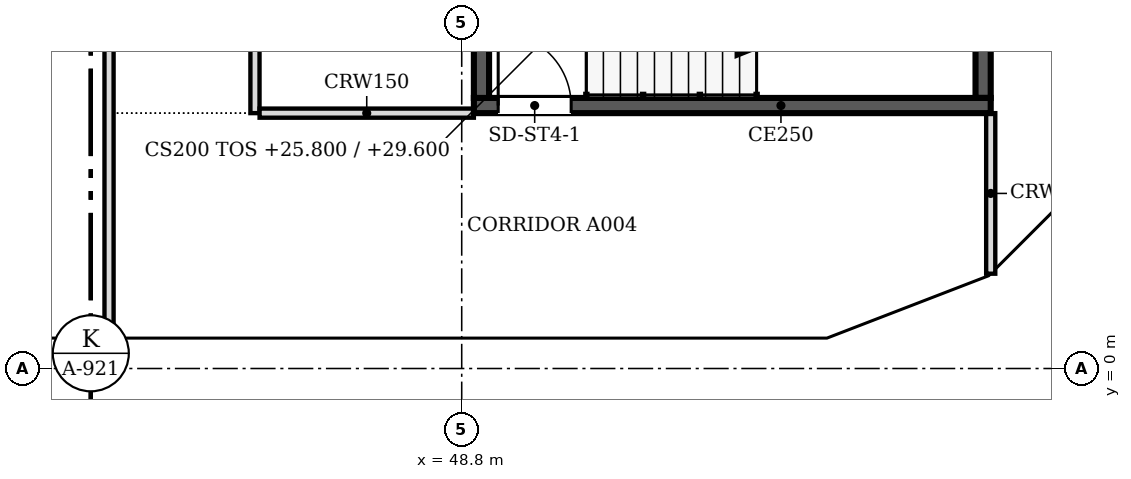
"""IFC4 building model, lengths in metres.
Left out: names, types, materials, properties, quantities, classifications, styles, units other than length and angle.
Written with IfcOpenShell. Run it as: python <this file> out.ifc"""

import sys

from ifc_helpers import new_model, si_unit, direction, frame, frame_2d, origin, place, context, subcontext, project, spatial, polyline, rectangle, outline, extrude, faceted_brep, source, transform, mapped, element, fill, save


model = new_model("IFC4")
c1 = context("Model", 3, precision=1e-05, world=origin(), true_north=direction((0.0, 1.0)))
c2 = subcontext(c1, "Body", "Model", "MODEL_VIEW")
j1 = project(units=[si_unit("LENGTHUNIT", "METRE"), si_unit("PLANEANGLEUNIT", "RADIAN")], contexts=[c1])
p1 = place(None, origin())
s1 = spatial("IfcSite", under=j1, at=p1, CompositionType="ELEMENT")
p2 = place(p1, origin())
s2 = spatial("IfcBuilding", under=s1, at=p2, CompositionType="ELEMENT")
p3 = place(p2, frame((0.0, 0.0, 25.8)))
s3 = spatial("IfcBuildingStorey", under=s2, at=p3, CompositionType="ELEMENT", Elevation=25.8)
m1 = source(origin(), c2, "Body", "SweptSolid", [
    extrude(outline(polyline([(6.1, 0.0), (3.05, 3.8), (0.0, 0.0), (6.1, 0.0)])), frame((0.0, 0.25, 0.0), z_axis=(0.0, -1.0, 0.0), x_axis=(1.0, 0.0, 0.0)), (0.0, 0.0, 1.0), 0.5),
])
p4 = place(p3, frame((39.65, 0.25, 0.0), z_axis=(0.0, 0.0, 1.0), x_axis=(1.0, 0.0, 0.0)))
e1 = element("IfcWall", 1, at=p4, inside=s3, PredefinedType="SOLIDWALL", context=c2, shape_type="MappedRepresentation", body=[
    mapped(m1, transform((0.0, 0.0, 0.0), scale=1.0)),
])
m2 = source(origin(), c2, "Body", "SweptSolid", [
    extrude(outline(polyline([(5.579, 0.25), (3.05, 3.401), (0.521, 0.25), (5.579, 0.25)])), frame((0.0, 0.26, 0.0), z_axis=(0.0, -1.0, 0.0), x_axis=(1.0, 0.0, 0.0)), (0.0, 0.0, 1.0), 0.52),
])
p5 = place(p4, origin())
e2 = element("IfcOpeningElement", 2, at=p5, cuts=e1, PredefinedType="OPENING", context=c2, shape_type="MappedRepresentation", body=[
    mapped(m2, transform((0.0, 0.0, 0.0), scale=1.0)),
])
p6 = place(p3, frame((45.75, 0.25, 0.0), z_axis=(0.0, 0.0, 1.0), x_axis=(1.0, 0.0, 0.0)))
e3 = element("IfcWall", 3, at=p6, inside=s3, PredefinedType="SOLIDWALL", context=c2, shape_type="MappedRepresentation", body=[
    mapped(m1, transform((0.0, 0.0, 0.0), scale=1.0)),
])
p7 = place(p6, origin())
e4 = element("IfcOpeningElement", 4, at=p7, cuts=e3, PredefinedType="OPENING", context=c2, shape_type="MappedRepresentation", body=[
    mapped(m2, transform((0.0, 0.0, 0.0), scale=1.0)),
])
m3 = source(origin(), c2, "Body", "Brep", [
    faceted_brep([(3.05, -0.25, 3.74), (3.003, -0.25, 3.8), (0.0, -0.25, 0.0), (3.05, -0.25, 0.0), (0.0, 0.25, 0.0), (2.957, 0.25, 3.741), (2.957, 0.25, 0.0), (3.003, 0.0, 3.8)], [[[0, 1, 2, 3]], [[4, 5, 6]], [[7, 1, 0]], [[5, 4, 2, 1, 7]], [[4, 6, 3, 2]], [[3, 6, 5, 7, 0]]]),
])
p8 = place(p3, frame((51.85, 0.25, 0.0), z_axis=(0.0, 0.0, 1.0), x_axis=(1.0, 0.0, 0.0)))
e5 = element("IfcWall", 5, at=p8, inside=s3, PredefinedType="SOLIDWALL", context=c2, shape_type="MappedRepresentation", body=[
    mapped(m3, transform((0.0, 0.0, 0.0), scale=1.0)),
])
m4 = source(origin(), c2, "Body", "SweptSolid", [
    extrude(outline(polyline([(2.803, 3.144), (0.516, 0.25), (2.803, 0.25), (2.803, 3.144)])), frame((0.0, 0.26, 0.0), z_axis=(0.0, -1.0, 0.0), x_axis=(1.0, 0.0, 0.0)), (0.0, 0.0, 1.0), 0.52),
])
p9 = place(p8, origin())
e6 = element("IfcOpeningElement", 6, at=p9, cuts=e5, PredefinedType="OPENING", context=c2, shape_type="MappedRepresentation", body=[
    mapped(m4, transform((0.0, 0.0, 0.0), scale=1.0)),
])
m5 = source(origin(), c2, "Body", "Brep", [
    faceted_brep([(2.997, -0.25, 0.0), (0.047, -0.25, 3.8), (0.0, -0.25, 3.741), (0.0, -0.25, 0.0), (0.093, 0.25, 3.74), (2.944, 0.25, 0.068), (2.944, 0.25, 0.0), (0.093, 0.25, 0.0), (0.047, 0.0, 3.8), (2.997, 0.0, 0.0)], [[[0, 1, 2, 3]], [[4, 5, 6, 7]], [[5, 4, 8, 1, 0, 9]], [[2, 1, 8]], [[7, 6, 9, 0, 3]], [[7, 3, 2, 8, 4]], [[9, 6, 5]]]),
])
p10 = place(p3, frame((54.81, 0.233, 0.0), z_axis=(0.0, 0.0, 1.0), x_axis=(0.932990326376, 0.359901446078, 0.0)))
e7 = element("IfcWall", 7, at=p10, inside=s3, PredefinedType="SOLIDWALL", context=c2, shape_type="MappedRepresentation", body=[
    mapped(m5, transform((0.0, 0.0, 0.0), scale=1.0)),
])
m6 = source(origin(), c2, "Body", "SweptSolid", [
    extrude(outline(polyline([(2.487, 0.25), (0.247, 3.135), (0.247, 0.25), (2.487, 0.25)])), frame((0.0, 0.26, 0.0), z_axis=(0.0, -1.0, 0.0), x_axis=(1.0, 0.0, 0.0)), (0.0, 0.0, 1.0), 0.52),
])
p11 = place(p10, origin())
e8 = element("IfcOpeningElement", 8, at=p11, cuts=e7, PredefinedType="OPENING", context=c2, shape_type="MappedRepresentation", body=[
    mapped(m6, transform((0.0, 0.0, 0.0), scale=1.0)),
])
m7 = source(origin(), c2, "Body", "Brep", [
    faceted_brep([(2.997, -0.25, 3.732), (2.944, -0.25, 3.8), (0.0, -0.25, 0.0), (2.997, -0.25, 0.0), (0.053, 0.25, 0.068), (2.891, 0.25, 3.732), (2.891, 0.25, 0.0), (0.053, 0.25, 0.0), (2.944, 0.0, 3.8), (0.0, 0.0, 0.0)], [[[0, 1, 2, 3]], [[4, 5, 6, 7]], [[8, 1, 0]], [[5, 4, 9, 2, 1, 8]], [[7, 6, 3, 2, 9]], [[7, 9, 4]], [[3, 6, 5, 8, 0]]]),
])
p12 = place(p3, frame((57.606, 1.312, 0.0), z_axis=(0.0, 0.0, 1.0), x_axis=(0.707147509625, 0.707066050402, 0.0)))
e9 = element("IfcWall", 9, at=p12, inside=s3, PredefinedType="SOLIDWALL", context=c2, shape_type="MappedRepresentation", body=[
    mapped(m7, transform((0.0, 0.0, 0.0), scale=1.0)),
])
m8 = source(origin(), c2, "Body", "SweptSolid", [
    extrude(outline(polyline([(2.744, 3.134), (0.51, 0.25), (2.744, 0.25), (2.744, 3.134)])), frame((0.0, 0.26, 0.0), z_axis=(0.0, -1.0, 0.0), x_axis=(1.0, 0.0, 0.0)), (0.0, 0.0, 1.0), 0.52),
])
p13 = place(p12, origin())
e10 = element("IfcOpeningElement", 10, at=p13, cuts=e9, PredefinedType="OPENING", context=c2, shape_type="MappedRepresentation", body=[
    mapped(m8, transform((0.0, 0.0, 0.0), scale=1.0)),
])
p14 = place(p2, frame((0.0, 0.0, 29.6)))
s4 = spatial("IfcBuildingStorey", under=s2, at=p14, CompositionType="ELEMENT", Elevation=29.6)
m9 = source(origin(), c2, "Body", "Brep", [
    faceted_brep([(3.05, -0.25, 0.0), (6.1, -0.25, 3.8), (6.1, -0.25, 3.8), (3.05, -0.25, 7.6), (0.0, -0.25, 3.8), (0.0, 0.25, 3.8), (3.05, 0.25, 7.6), (6.1, 0.25, 3.8), (6.1, 0.25, 3.8), (3.05, 0.25, 0.0)], [[[0, 1, 2, 3, 4]], [[5, 6, 7, 8, 9]], [[9, 8, 1, 0]], [[7, 6, 3, 2]], [[6, 5, 4, 3]], [[5, 9, 0, 4]], [[1, 8, 7, 2]]]),
])
p15 = place(p14, frame((36.6, 0.25, -3.8), z_axis=(0.0, 0.0, 1.0), x_axis=(1.0, 0.0, 0.0)))
e11 = element("IfcWall", 11, at=p15, inside=s4, PredefinedType="SOLIDWALL", context=c2, shape_type="MappedRepresentation", body=[
    mapped(m9, transform((0.0, 0.0, 0.0), scale=1.0)),
])
m10 = source(origin(), c2, "Body", "SweptSolid", [
    extrude(outline(polyline([(3.05, 0.399), (5.78, 3.8), (3.05, 7.2), (0.321, 3.8), (3.05, 0.399)])), frame((0.0, 0.26, 0.0), z_axis=(0.0, -1.0, 0.0), x_axis=(1.0, 0.0, 0.0)), (0.0, 0.0, 1.0), 0.52),
])
p16 = place(p15, origin())
e12 = element("IfcOpeningElement", 12, at=p16, cuts=e11, PredefinedType="OPENING", context=c2, shape_type="MappedRepresentation", body=[
    mapped(m10, transform((0.0, 0.0, 0.0), scale=1.0)),
])
m11 = source(origin(), c2, "Body", "SweptSolid", [
    extrude(outline(polyline([(3.05, 0.0), (6.1, 3.8), (3.05, 7.6), (0.0, 3.8), (3.05, 0.0)])), frame((0.0, 0.25, 0.0), z_axis=(0.0, -1.0, 0.0), x_axis=(1.0, 0.0, 0.0)), (0.0, 0.0, 1.0), 0.5),
])
p17 = place(p14, frame((42.7, 0.25, -3.8), z_axis=(0.0, 0.0, 1.0), x_axis=(1.0, 0.0, 0.0)))
e13 = element("IfcWall", 13, at=p17, inside=s4, PredefinedType="SOLIDWALL", context=c2, shape_type="MappedRepresentation", body=[
    mapped(m11, transform((0.0, 0.0, 0.0), scale=1.0)),
])
p18 = place(p17, origin())
e14 = element("IfcOpeningElement", 14, at=p18, cuts=e13, PredefinedType="OPENING", context=c2, shape_type="MappedRepresentation", body=[
    mapped(m10, transform((0.0, 0.0, 0.0), scale=1.0)),
])
m12 = source(origin(), c2, "Body", "Brep", [
    faceted_brep([(3.05, -0.25, 0.0), (6.053, -0.25, 3.8), (3.05, -0.25, 7.6), (0.0, -0.25, 3.8), (0.0, 0.25, 3.8), (3.05, 0.25, 7.6), (6.007, 0.25, 3.859), (6.007, 0.25, 3.741), (3.05, 0.25, 0.0), (6.053, 0.0, 3.8)], [[[0, 1, 2, 3]], [[4, 5, 6, 7, 8]], [[8, 7, 9, 1, 0]], [[6, 5, 2, 1, 9]], [[5, 4, 3, 2]], [[4, 8, 0, 3]], [[7, 6, 9]]]),
])
p19 = place(p14, frame((48.8, 0.25, -3.8), z_axis=(0.0, 0.0, 1.0), x_axis=(1.0, 0.0, 0.0)))
e15 = element("IfcWall", 15, at=p19, inside=s4, PredefinedType="SOLIDWALL", context=c2, shape_type="MappedRepresentation", body=[
    mapped(m12, transform((0.0, 0.0, 0.0), scale=1.0)),
])
m13 = source(origin(), c2, "Body", "SweptSolid", [
    extrude(outline(polyline([(3.049, 0.401), (5.735, 3.8), (3.049, 7.199), (0.321, 3.8), (3.049, 0.401)])), frame((0.0, 0.26, 0.0), z_axis=(0.0, -1.0, 0.0), x_axis=(1.0, 0.0, 0.0)), (0.0, 0.0, 1.0), 0.52),
])
p20 = place(p19, origin())
e16 = element("IfcOpeningElement", 16, at=p20, cuts=e15, PredefinedType="OPENING", context=c2, shape_type="MappedRepresentation", body=[
    mapped(m13, transform((0.0, 0.0, 0.0), scale=1.0)),
])
m14 = source(origin(), c2, "Body", "Brep", [
    faceted_brep([(2.95, -0.25, 0.0), (3.003, -0.25, 0.068), (3.003, -0.25, 7.531), (2.95, -0.25, 7.6), (0.0, -0.25, 3.8), (0.047, 0.25, 3.86), (2.898, 0.25, 7.532), (2.898, 0.25, 0.068), (0.047, 0.25, 3.74), (2.95, 0.0, 0.0), (2.95, 0.0, 7.6), (0.0, 0.0, 3.8)], [[[0, 1, 2, 3, 4]], [[5, 6, 7, 8]], [[1, 0, 9]], [[10, 3, 2]], [[6, 5, 11, 4, 3, 10]], [[8, 7, 9, 0, 4, 11]], [[8, 11, 5]], [[1, 9, 7, 6, 10, 2]]]),
])
p21 = place(p14, frame((54.854, 0.25, -3.8), z_axis=(0.0, 0.0, 1.0), x_axis=(0.932970071518, 0.359953949349, 0.0)))
e17 = element("IfcWall", 17, at=p21, inside=s4, PredefinedType="SOLIDWALL", context=c2, shape_type="MappedRepresentation", body=[
    mapped(m14, transform((0.0, 0.0, 0.0), scale=1.0)),
])
m15 = source(origin(), c2, "Body", "SweptSolid", [
    extrude(outline(polyline([(2.75, 6.935), (0.316, 3.8), (2.75, 0.665), (2.75, 6.935)])), frame((0.0, 0.26, 0.0), z_axis=(0.0, -1.0, 0.0), x_axis=(1.0, 0.0, 0.0)), (0.0, 0.0, 1.0), 0.52),
])
p22 = place(p21, origin())
e18 = element("IfcOpeningElement", 18, at=p22, cuts=e17, PredefinedType="OPENING", context=c2, shape_type="MappedRepresentation", body=[
    mapped(m15, transform((0.0, 0.0, 0.0), scale=1.0)),
])
m16 = source(origin(), c2, "Body", "Brep", [
    faceted_brep([(0.053, -0.25, 0.0), (2.997, -0.25, 3.8), (0.053, -0.25, 7.6), (0.0, -0.25, 7.532), (0.0, -0.25, 0.068), (0.106, 0.25, 7.531), (2.944, 0.25, 3.868), (2.944, 0.25, 3.732), (0.106, 0.25, 0.068), (2.997, 0.0, 3.8), (0.053, 0.0, 0.0), (0.053, 0.0, 7.6)], [[[0, 1, 2, 3, 4]], [[5, 6, 7, 8]], [[8, 7, 9, 1, 0, 10]], [[6, 5, 11, 2, 1, 9]], [[3, 2, 11]], [[10, 0, 4]], [[8, 10, 4, 3, 11, 5]], [[7, 6, 9]]]),
])
p23 = place(p14, frame((57.569, 1.274, -3.8), z_axis=(0.0, 0.0, 1.0), x_axis=(0.707066050402, 0.707147509625, 0.0)))
e19 = element("IfcWall", 19, at=p23, inside=s4, PredefinedType="SOLIDWALL", context=c2, shape_type="MappedRepresentation", body=[
    mapped(m16, transform((0.0, 0.0, 0.0), scale=1.0)),
])
m17 = source(origin(), c2, "Body", "SweptSolid", [
    extrude(outline(polyline([(0.253, 0.666), (2.681, 3.8), (0.253, 6.934), (0.253, 0.666)])), frame((0.0, 0.26, 0.0), z_axis=(0.0, -1.0, 0.0), x_axis=(1.0, 0.0, 0.0)), (0.0, 0.0, 1.0), 0.52),
])
p24 = place(p23, origin())
e20 = element("IfcOpeningElement", 20, at=p24, cuts=e19, PredefinedType="OPENING", context=c2, shape_type="MappedRepresentation", body=[
    mapped(m17, transform((0.0, 0.0, 0.0), scale=1.0)),
])
p25 = place(p3, frame((57.5, 4.325, 0.0), z_axis=(0.0, 0.0, 1.0), x_axis=(-1.0, 0.0, 0.0)))
e21 = element("IfcWall", 21, at=p25, inside=s3, PredefinedType="SOLIDWALL", context=c2, shape_type="SweptSolid", body=[
    extrude(rectangle(XDim=8.5, YDim=0.25, at=frame_2d((4.25, 0.0))), origin(), (0.0, 0.0, 1.0), 3.8),
])
m18 = source(origin(), c2, "Body", "SweptSolid", [
    extrude(rectangle(XDim=1.2, YDim=2.1, at=frame_2d((0.6, 1.05))), frame((0.0, 0.135, 0.0), z_axis=(0.0, -1.0, 0.0), x_axis=(1.0, 0.0, 0.0)), (0.0, 0.0, 1.0), 0.27),
])
p26 = place(p25, frame((6.9, 0.0, 0.0)))
e22 = element("IfcOpeningElement", 22, at=p26, cuts=e21, PredefinedType="OPENING", context=c2, shape_type="MappedRepresentation", body=[
    mapped(m18, transform((0.0, 0.0, 0.0), scale=1.0)),
])
for number, where, z_axis, x_axis in (
    (23, (49.125, 4.45, 0.0), (0.0, 0.0, 1.0), (0.0, 1.0, 0.0)),
    (24, (57.375, 7.85, 0.0), (0.0, 0.0, 1.0), (0.0, -1.0, 0.0)),
):
    element("IfcWall", number, at=place(p3, frame(where, z_axis=z_axis, x_axis=x_axis)), inside=s3, PredefinedType="SOLIDWALL", context=c2, shape_type="SweptSolid", body=[
        extrude(rectangle(XDim=3.4, YDim=0.25, at=frame_2d((1.7, 0.0))), origin(), (0.0, 0.0, 1.0), 3.8),
    ])
p27 = place(p3, frame((43.0, 0.5, 0.0), z_axis=(0.0, 0.0, 1.0), x_axis=(0.0, 1.0, 0.0)))
e25 = element("IfcWall", 25, at=p27, inside=s3, PredefinedType="PARTITIONING", context=c2, shape_type="SweptSolid", body=[
    extrude(rectangle(XDim=21.424, YDim=0.15, at=frame_2d((10.712, 0.0))), origin(), (0.0, 0.0, 1.0), 3.067),
])
m19 = source(origin(), c2, "Body", "SweptSolid", [
    extrude(rectangle(XDim=0.9, YDim=2.1, at=frame_2d((0.45, 1.05))), frame((0.0, 0.085, 0.0), z_axis=(0.0, -1.0, 0.0), x_axis=(1.0, 0.0, 0.0)), (0.0, 0.0, 1.0), 0.17),
])
p28 = place(p27, frame((6.2, 0.0, 0.0)))
e26 = element("IfcOpeningElement", 26, at=p28, cuts=e25, PredefinedType="OPENING", context=c2, shape_type="MappedRepresentation", body=[
    mapped(m19, transform((0.0, 0.0, 0.0), scale=1.0)),
])
p29 = place(p27, frame((15.1, 0.0, 0.0)))
e27 = element("IfcOpeningElement", 27, at=p29, cuts=e25, PredefinedType="OPENING", context=c2, shape_type="MappedRepresentation", body=[
    mapped(m19, transform((0.0, 0.0, 0.0), scale=1.0)),
])
p30 = place(p3, frame((57.5, 1.559, 0.0), z_axis=(0.0, 0.0, 1.0), x_axis=(0.0, 1.0, 0.0)))
e28 = element("IfcWall", 28, at=p30, inside=s3, PredefinedType="PARTITIONING", context=c2, shape_type="SweptSolid", body=[
    extrude(rectangle(XDim=2.641, YDim=0.15, at=frame_2d((1.32, 0.0))), origin(), (0.0, 0.0, 1.0), 3.067),
])
p31 = place(p3, frame((45.4, 22.0, 0.0), z_axis=(0.0, 0.0, 1.0), x_axis=(0.0, -1.0, 0.0)))
e29 = element("IfcWall", 29, at=p31, inside=s3, PredefinedType="PARTITIONING", context=c2, shape_type="SweptSolid", body=[
    extrude(rectangle(XDim=17.8, YDim=0.15, at=frame_2d((8.9, 0.0))), origin(), (0.0, 0.0, 1.0), 3.067),
])
m20 = source(origin(), c2, "Body", "SweptSolid", [
    extrude(rectangle(XDim=1.0, YDim=2.1, at=frame_2d((0.5, 1.05))), frame((0.0, 0.085, 0.0), z_axis=(0.0, -1.0, 0.0), x_axis=(1.0, 0.0, 0.0)), (0.0, 0.0, 1.0), 0.17),
])
p32 = place(p31, frame((1.999, 0.0, 0.0)))
e30 = element("IfcOpeningElement", 30, at=p32, cuts=e29, PredefinedType="OPENING", context=c2, shape_type="MappedRepresentation", body=[
    mapped(m20, transform((0.0, 0.0, 0.0), scale=1.0)),
])
p33 = place(p31, frame((10.9, 0.0, 0.0)))
e31 = element("IfcOpeningElement", 31, at=p33, cuts=e29, PredefinedType="OPENING", context=c2, shape_type="MappedRepresentation", body=[
    mapped(m20, transform((0.0, 0.0, 0.0), scale=1.0)),
])
p34 = place(p3, frame((45.476, 4.2, 0.0), z_axis=(0.0, 0.0, 1.0), x_axis=(1.0, 0.0, 0.0)))
e32 = element("IfcWall", 32, at=p34, inside=s3, PredefinedType="PARTITIONING", context=c2, shape_type="SweptSolid", body=[
    extrude(rectangle(XDim=3.524, YDim=0.15, at=frame_2d((1.762, 0.0))), origin(), (0.0, 0.0, 1.0), 3.067),
])
m21 = source(origin(), c2, "Body", "SweptSolid", [
    extrude(rectangle(XDim=1.2, YDim=2.1, at=frame_2d((0.6, 1.05))), frame((0.0, 0.025, 0.0), z_axis=(0.0, -1.0, 0.0), x_axis=(1.0, 0.0, 0.0)), (0.0, 0.0, 1.0), 0.05),
])
p35 = place(p26, origin())
e33 = element("IfcDoor", 33, at=p35, inside=s3, OperationType="SINGLE_SWING_RIGHT", PredefinedType="DOOR", context=c2, shape_type="MappedRepresentation", body=[
    mapped(m21, transform((0.0, 0.0, 0.0), scale=1.0)),
])
fill(e22, e33)
save(model, sys.argv[1])
